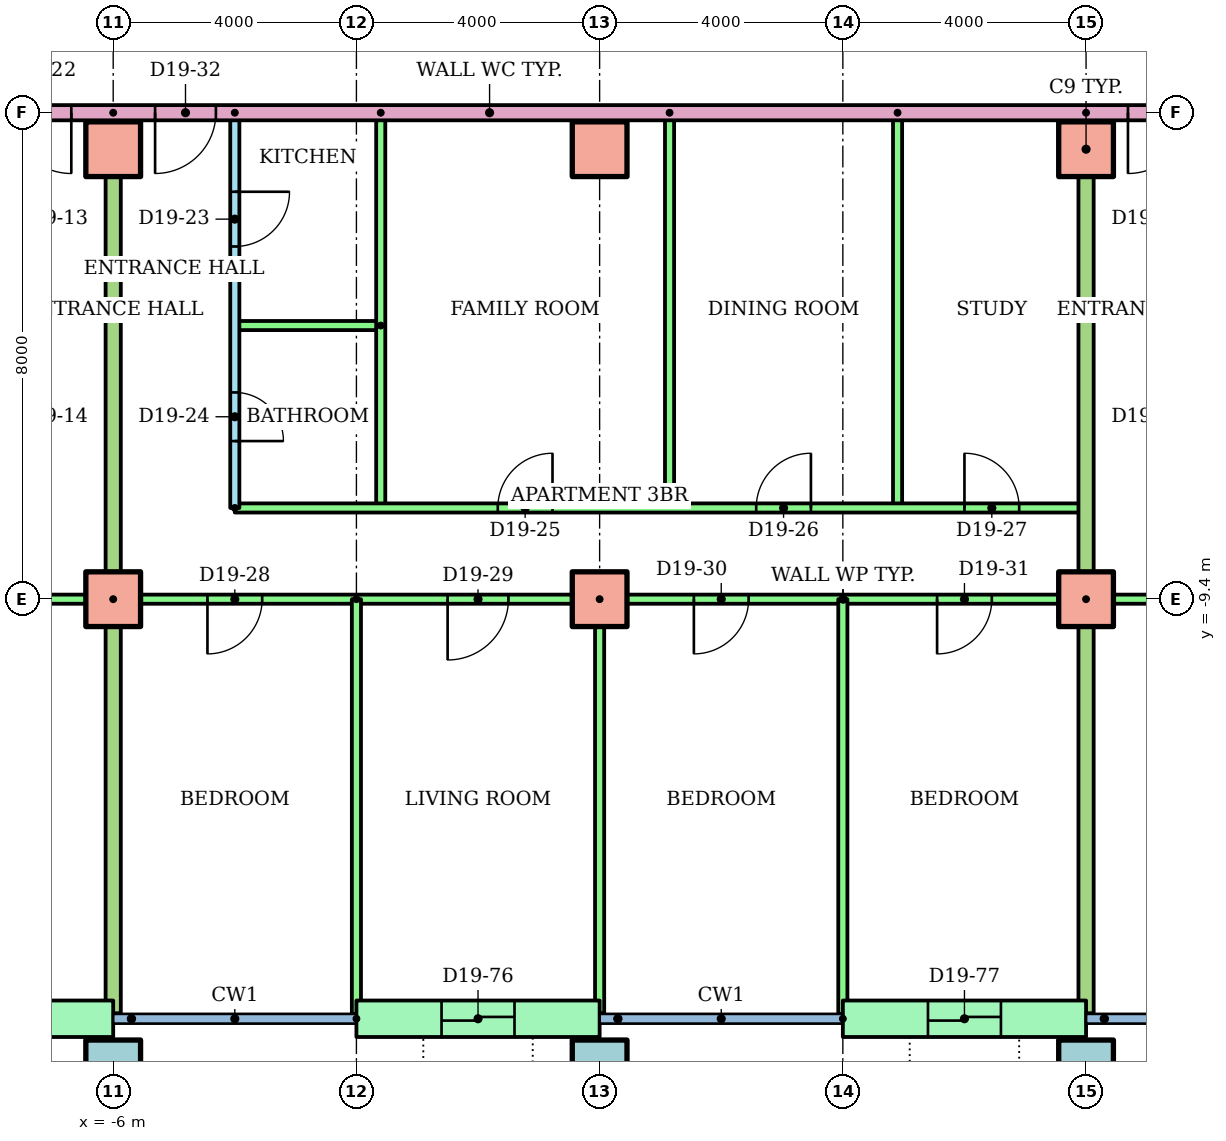
"""IFC4 building model, lengths in metres.
Left out: names, types, materials, properties, quantities, classifications, styles, units other than length and angle.
Written with IfcOpenShell. Run it as: python <this file> out.ifc"""

import sys

from ifc_helpers import new_model, si_unit, direction, frame, frame_2d, origin, origin_2d, place, context, subcontext, project, spatial, rectangle, hollow_rectangle, extrude, element, fill, save


model = new_model("IFC4")
c1 = context("Model", 3, precision=1e-05, world=origin(), true_north=direction((0.0, 1.0)))
c2 = subcontext(c1, "Body", "Model", "MODEL_VIEW")
j1 = project(units=[si_unit("LENGTHUNIT", "METRE"), si_unit("PLANEANGLEUNIT", "RADIAN")], contexts=[c1])
p1 = place(None, origin())
s1 = spatial("IfcSite", under=j1, at=p1, CompositionType="ELEMENT")
p2 = place(p1, origin())
s2 = spatial("IfcBuilding", under=s1, at=p2, CompositionType="ELEMENT")
p3 = place(p2, frame((0.0, 0.0, 77.5)))
s3 = spatial("IfcBuildingStorey", under=s2, at=p3, CompositionType="ELEMENT", Elevation=77.5)
for number, where in (
    (1, (-6.0, -17.1, 0.0)),
    (2, (2.0, -17.1, 0.0)),
    (3, (10.0, -17.1, 0.0)),
):
    element("IfcColumn", number, at=place(p3, frame(where)), inside=s3, PredefinedType="COLUMN", context=c2, shape_type="SweptSolid", body=[
        extrude(hollow_rectangle(XDim=0.9, YDim=0.9, WallThickness=0.045, at=origin_2d()), origin(), (0.0, 0.0, 1.0), 3.2),
    ])
for number, where in (
    (4, (-6.0, -9.4, 0.0)),
    (5, (2.0, -9.4, 0.0)),
    (6, (10.0, -9.4, 0.0)),
    (7, (-6.0, -2.0, 0.0)),
    (8, (2.0, -2.0, 0.0)),
    (9, (10.0, -2.0, 0.0)),
):
    element("IfcColumn", number, at=place(p3, frame(where)), inside=s3, PredefinedType="COLUMN", context=c2, shape_type="SweptSolid", body=[
        extrude(rectangle(XDim=0.9, YDim=0.9, at=origin_2d()), origin(), (0.0, 0.0, 1.0), 3.2),
    ])
p4 = place(p3, frame((-10.0, -16.3, 0.0)))
e10 = element("IfcWall", 10, at=p4, inside=s3, PredefinedType="STANDARD", context=c2, shape_type="SweptSolid", body=[
    extrude(rectangle(XDim=4.0, YDim=0.6, at=frame_2d((2.0, 0.0))), origin(), (0.0, 0.0, 1.0), 2.92),
])
p5 = place(p4, frame((1.4, 0.0, 0.0)))
e11 = element("IfcOpeningElement", 11, at=p5, cuts=e10, PredefinedType="OPENING", context=c2, shape_type="SweptSolid", body=[
    extrude(rectangle(XDim=1.2, YDim=2.1, at=frame_2d((0.6, 1.05))), frame((0.0, 0.31, 0.0), z_axis=(0.0, -1.0, 0.0), x_axis=(1.0, 0.0, 0.0)), (0.0, 0.0, 1.0), 0.62),
])
p6 = place(p3, frame((-2.0, -16.3, 0.0)))
e12 = element("IfcWall", 12, at=p6, inside=s3, PredefinedType="STANDARD", context=c2, shape_type="SweptSolid", body=[
    extrude(rectangle(XDim=4.0, YDim=0.6, at=frame_2d((2.0, 0.0))), origin(), (0.0, 0.0, 1.0), 2.92),
])
p7 = place(p6, frame((1.4, 0.0, 0.0)))
e13 = element("IfcOpeningElement", 13, at=p7, cuts=e12, PredefinedType="OPENING", context=c2, shape_type="SweptSolid", body=[
    extrude(rectangle(XDim=1.2, YDim=2.1, at=frame_2d((0.6, 1.05))), frame((0.0, 0.31, 0.0), z_axis=(0.0, -1.0, 0.0), x_axis=(1.0, 0.0, 0.0)), (0.0, 0.0, 1.0), 0.62),
])
p8 = place(p3, frame((6.0, -16.3, 0.0)))
e14 = element("IfcWall", 14, at=p8, inside=s3, PredefinedType="STANDARD", context=c2, shape_type="SweptSolid", body=[
    extrude(rectangle(XDim=4.0, YDim=0.6, at=frame_2d((2.0, 0.0))), origin(), (0.0, 0.0, 1.0), 2.92),
])
p9 = place(p8, frame((1.4, 0.0, 0.0)))
e15 = element("IfcOpeningElement", 15, at=p9, cuts=e14, PredefinedType="OPENING", context=c2, shape_type="SweptSolid", body=[
    extrude(rectangle(XDim=1.2, YDim=2.1, at=frame_2d((0.6, 1.05))), frame((0.0, 0.31, 0.0), z_axis=(0.0, -1.0, 0.0), x_axis=(1.0, 0.0, 0.0)), (0.0, 0.0, 1.0), 0.62),
])
p10 = place(p3, frame((-6.0, -9.4, 0.0), z_axis=(0.0, 0.0, 1.0), x_axis=(-1.0, 0.0, 0.0)))
e16 = element("IfcWall", 16, at=p10, inside=s3, PredefinedType="PARTITIONING", context=c2, shape_type="SweptSolid", body=[
    extrude(rectangle(XDim=22.61, YDim=0.15, at=frame_2d((11.305, 0.0))), origin(), (0.0, 0.0, 1.0), 2.4),
])
p11 = place(p10, frame((19.7, 0.0, 0.0)))
e17 = element("IfcOpeningElement", 17, at=p11, cuts=e16, PredefinedType="OPENING", context=c2, shape_type="SweptSolid", body=[
    extrude(rectangle(XDim=0.9, YDim=2.1, at=frame_2d((0.45, 1.05))), frame((0.0, 0.085, 0.0), z_axis=(0.0, -1.0, 0.0), x_axis=(1.0, 0.0, 0.0)), (0.0, 0.0, 1.0), 0.17),
])
p12 = place(p10, frame((12.45, 0.0, 0.0)))
e18 = element("IfcOpeningElement", 18, at=p12, cuts=e16, PredefinedType="OPENING", context=c2, shape_type="SweptSolid", body=[
    extrude(rectangle(XDim=1.0, YDim=2.1, at=frame_2d((0.5, 1.05))), frame((0.0, 0.085, 0.0), z_axis=(0.0, -1.0, 0.0), x_axis=(1.0, 0.0, 0.0)), (0.0, 0.0, 1.0), 0.17),
])
p13 = place(p10, frame((5.55, 0.0, 0.0)))
e19 = element("IfcOpeningElement", 19, at=p13, cuts=e16, PredefinedType="OPENING", context=c2, shape_type="SweptSolid", body=[
    extrude(rectangle(XDim=0.9, YDim=2.1, at=frame_2d((0.45, 1.05))), frame((0.0, 0.085, 0.0), z_axis=(0.0, -1.0, 0.0), x_axis=(1.0, 0.0, 0.0)), (0.0, 0.0, 1.0), 0.17),
])
p14 = place(p10, frame((1.55, 0.0, 0.0)))
e20 = element("IfcOpeningElement", 20, at=p14, cuts=e16, PredefinedType="OPENING", context=c2, shape_type="SweptSolid", body=[
    extrude(rectangle(XDim=0.9, YDim=2.1, at=frame_2d((0.45, 1.05))), frame((0.0, 0.085, 0.0), z_axis=(0.0, -1.0, 0.0), x_axis=(1.0, 0.0, 0.0)), (0.0, 0.0, 1.0), 0.17),
])
p15 = place(p3, frame((-4.0, -1.4, 0.0), z_axis=(0.0, 0.0, 1.0), x_axis=(0.0, -1.0, 0.0)))
e21 = element("IfcWall", 21, at=p15, inside=s3, PredefinedType="PARTITIONING", context=c2, shape_type="SweptSolid", body=[
    extrude(rectangle(XDim=6.5, YDim=0.15, at=frame_2d((3.25, 0.0))), origin(), (0.0, 0.0, 1.0), 2.4),
])
p16 = place(p15, frame((1.3, 0.0, 0.0)))
e22 = element("IfcOpeningElement", 22, at=p16, cuts=e21, PredefinedType="OPENING", context=c2, shape_type="SweptSolid", body=[
    extrude(rectangle(XDim=0.9, YDim=2.1, at=frame_2d((0.45, 1.05))), frame((0.0, 0.085, 0.0), z_axis=(0.0, -1.0, 0.0), x_axis=(1.0, 0.0, 0.0)), (0.0, 0.0, 1.0), 0.17),
])
p17 = place(p15, frame((4.6, 0.0, 0.0)))
e23 = element("IfcOpeningElement", 23, at=p17, cuts=e21, PredefinedType="OPENING", context=c2, shape_type="SweptSolid", body=[
    extrude(rectangle(XDim=0.8, YDim=2.1, at=frame_2d((0.4, 1.05))), frame((0.0, 0.085, 0.0), z_axis=(0.0, -1.0, 0.0), x_axis=(1.0, 0.0, 0.0)), (0.0, 0.0, 1.0), 0.17),
])
p18 = place(p3, frame((-1.6, -4.9, 0.0), z_axis=(0.0, 0.0, 1.0), x_axis=(-1.0, 0.0, 0.0)))
e24 = element("IfcWall", 24, at=p18, inside=s3, PredefinedType="PARTITIONING", context=c2, shape_type="SweptSolid", body=[
    extrude(rectangle(XDim=2.4, YDim=0.15, at=frame_2d((1.2, 0.0))), origin(), (0.0, 0.0, 1.0), 2.4),
])
for number, where, z_axis, x_axis in (
    (25, (-1.6, -1.4, 0.0), (0.0, 0.0, 1.0), (0.0, -1.0, 0.0)),
    (26, (3.15, -1.4, 0.0), (0.0, 0.0, 1.0), (0.0, -1.0, 0.0)),
    (27, (6.9, -1.4, 0.0), (0.0, 0.0, 1.0), (0.0, -1.0, 0.0)),
):
    element("IfcWall", number, at=place(p3, frame(where, z_axis=z_axis, x_axis=x_axis)), inside=s3, PredefinedType="PARTITIONING", context=c2, shape_type="SweptSolid", body=[
        extrude(rectangle(XDim=6.5, YDim=0.15, at=frame_2d((3.25, 0.0))), origin(), (0.0, 0.0, 1.0), 2.4),
    ])
p19 = place(p3, frame((-4.0, -7.9, 0.0)))
e28 = element("IfcWall", 28, at=p19, inside=s3, PredefinedType="PARTITIONING", context=c2, shape_type="SweptSolid", body=[
    extrude(rectangle(XDim=14.0, YDim=0.15, at=frame_2d((7.0, 0.0))), origin(), (0.0, 0.0, 1.0), 2.4),
])
p20 = place(p19, frame((4.325, 0.0, 0.0)))
e29 = element("IfcOpeningElement", 29, at=p20, cuts=e28, PredefinedType="OPENING", context=c2, shape_type="SweptSolid", body=[
    extrude(rectangle(XDim=0.9, YDim=2.1, at=frame_2d((0.45, 1.05))), frame((0.0, 0.085, 0.0), z_axis=(0.0, -1.0, 0.0), x_axis=(1.0, 0.0, 0.0)), (0.0, 0.0, 1.0), 0.17),
])
p21 = place(p19, frame((8.575, 0.0, 0.0)))
e30 = element("IfcOpeningElement", 30, at=p21, cuts=e28, PredefinedType="OPENING", context=c2, shape_type="SweptSolid", body=[
    extrude(rectangle(XDim=0.9, YDim=2.1, at=frame_2d((0.45, 1.05))), frame((0.0, 0.085, 0.0), z_axis=(0.0, -1.0, 0.0), x_axis=(1.0, 0.0, 0.0)), (0.0, 0.0, 1.0), 0.17),
])
p22 = place(p19, frame((12.0, 0.0, 0.0)))
e31 = element("IfcOpeningElement", 31, at=p22, cuts=e28, PredefinedType="OPENING", context=c2, shape_type="SweptSolid", body=[
    extrude(rectangle(XDim=0.9, YDim=2.1, at=frame_2d((0.45, 1.05))), frame((0.0, 0.085, 0.0), z_axis=(0.0, -1.0, 0.0), x_axis=(1.0, 0.0, 0.0)), (0.0, 0.0, 1.0), 0.17),
])
p23 = place(p3, frame((10.0, -9.4, 0.0), z_axis=(0.0, 0.0, 1.0), x_axis=(-1.0, 0.0, 0.0)))
e32 = element("IfcWall", 32, at=p23, inside=s3, PredefinedType="PARTITIONING", context=c2, shape_type="SweptSolid", body=[
    extrude(rectangle(XDim=16.0, YDim=0.15, at=frame_2d((8.0, 0.0))), origin(), (0.0, 0.0, 1.0), 2.4),
])
p24 = place(p23, frame((13.55, 0.0, 0.0)))
e33 = element("IfcOpeningElement", 33, at=p24, cuts=e32, PredefinedType="OPENING", context=c2, shape_type="SweptSolid", body=[
    extrude(rectangle(XDim=0.9, YDim=2.1, at=frame_2d((0.45, 1.05))), frame((0.0, 0.085, 0.0), z_axis=(0.0, -1.0, 0.0), x_axis=(1.0, 0.0, 0.0)), (0.0, 0.0, 1.0), 0.17),
])
p25 = place(p23, frame((9.5, 0.0, 0.0)))
e34 = element("IfcOpeningElement", 34, at=p25, cuts=e32, PredefinedType="OPENING", context=c2, shape_type="SweptSolid", body=[
    extrude(rectangle(XDim=1.0, YDim=2.1, at=frame_2d((0.5, 1.05))), frame((0.0, 0.085, 0.0), z_axis=(0.0, -1.0, 0.0), x_axis=(1.0, 0.0, 0.0)), (0.0, 0.0, 1.0), 0.17),
])
p26 = place(p23, frame((5.55, 0.0, 0.0)))
e35 = element("IfcOpeningElement", 35, at=p26, cuts=e32, PredefinedType="OPENING", context=c2, shape_type="SweptSolid", body=[
    extrude(rectangle(XDim=0.9, YDim=2.1, at=frame_2d((0.45, 1.05))), frame((0.0, 0.085, 0.0), z_axis=(0.0, -1.0, 0.0), x_axis=(1.0, 0.0, 0.0)), (0.0, 0.0, 1.0), 0.17),
])
p27 = place(p23, frame((1.55, 0.0, 0.0)))
e36 = element("IfcOpeningElement", 36, at=p27, cuts=e32, PredefinedType="OPENING", context=c2, shape_type="SweptSolid", body=[
    extrude(rectangle(XDim=0.9, YDim=2.1, at=frame_2d((0.45, 1.05))), frame((0.0, 0.085, 0.0), z_axis=(0.0, -1.0, 0.0), x_axis=(1.0, 0.0, 0.0)), (0.0, 0.0, 1.0), 0.17),
])
p28 = place(p3, frame((-2.0, -9.4, 0.0), z_axis=(0.0, 0.0, 1.0), x_axis=(0.0, -1.0, 0.0)))
e37 = element("IfcWall", 37, at=p28, inside=s3, PredefinedType="PARTITIONING", context=c2, shape_type="SweptSolid", body=[
    extrude(rectangle(XDim=6.821, YDim=0.15, at=frame_2d((3.411, 0.0))), origin(), (0.0, 0.0, 1.0), 2.4),
])
p29 = place(p3, frame((2.0, -9.4, 0.0), z_axis=(0.0, 0.0, 1.0), x_axis=(0.0, -1.0, 0.0)))
e38 = element("IfcWall", 38, at=p29, inside=s3, PredefinedType="PARTITIONING", context=c2, shape_type="SweptSolid", body=[
    extrude(rectangle(XDim=6.81, YDim=0.15, at=frame_2d((3.405, 0.0))), origin(), (0.0, 0.0, 1.0), 2.4),
])
p30 = place(p3, frame((6.0, -9.4, 0.0), z_axis=(0.0, 0.0, 1.0), x_axis=(0.0, -1.0, 0.0)))
e39 = element("IfcWall", 39, at=p30, inside=s3, PredefinedType="PARTITIONING", context=c2, shape_type="SweptSolid", body=[
    extrude(rectangle(XDim=6.821, YDim=0.15, at=frame_2d((3.411, 0.0))), origin(), (0.0, 0.0, 1.0), 2.4),
])
p31 = place(p3, frame((-6.0, -1.4, 0.0), z_axis=(0.0, 0.0, 1.0), x_axis=(0.0, -1.0, 0.0)))
e40 = element("IfcWall", 40, at=p31, inside=s3, PredefinedType="PARTITIONING", context=c2, shape_type="SweptSolid", body=[
    extrude(rectangle(XDim=14.81, YDim=0.25, at=frame_2d((7.405, 0.0))), origin(), (0.0, 0.0, 1.0), 2.4),
])
p32 = place(p3, frame((26.0, -9.4, 0.0), z_axis=(0.0, 0.0, 1.0), x_axis=(-1.0, 0.0, 0.0)))
e41 = element("IfcWall", 41, at=p32, inside=s3, PredefinedType="PARTITIONING", context=c2, shape_type="SweptSolid", body=[
    extrude(rectangle(XDim=16.0, YDim=0.15, at=frame_2d((8.0, 0.0))), origin(), (0.0, 0.0, 1.0), 2.4),
])
p33 = place(p32, frame((13.55, 0.0, 0.0)))
e42 = element("IfcOpeningElement", 42, at=p33, cuts=e41, PredefinedType="OPENING", context=c2, shape_type="SweptSolid", body=[
    extrude(rectangle(XDim=0.9, YDim=2.1, at=frame_2d((0.45, 1.05))), frame((0.0, 0.085, 0.0), z_axis=(0.0, -1.0, 0.0), x_axis=(1.0, 0.0, 0.0)), (0.0, 0.0, 1.0), 0.17),
])
p34 = place(p32, frame((9.55, 0.0, 0.0)))
e43 = element("IfcOpeningElement", 43, at=p34, cuts=e41, PredefinedType="OPENING", context=c2, shape_type="SweptSolid", body=[
    extrude(rectangle(XDim=0.9, YDim=2.1, at=frame_2d((0.45, 1.05))), frame((0.0, 0.085, 0.0), z_axis=(0.0, -1.0, 0.0), x_axis=(1.0, 0.0, 0.0)), (0.0, 0.0, 1.0), 0.17),
])
p35 = place(p32, frame((5.55, 0.0, 0.0)))
e44 = element("IfcOpeningElement", 44, at=p35, cuts=e41, PredefinedType="OPENING", context=c2, shape_type="SweptSolid", body=[
    extrude(rectangle(XDim=0.9, YDim=2.1, at=frame_2d((0.45, 1.05))), frame((0.0, 0.085, 0.0), z_axis=(0.0, -1.0, 0.0), x_axis=(1.0, 0.0, 0.0)), (0.0, 0.0, 1.0), 0.17),
])
p36 = place(p32, frame((1.5, 0.0, 0.0)))
e45 = element("IfcOpeningElement", 45, at=p36, cuts=e41, PredefinedType="OPENING", context=c2, shape_type="SweptSolid", body=[
    extrude(rectangle(XDim=1.0, YDim=2.1, at=frame_2d((0.5, 1.05))), frame((0.0, 0.085, 0.0), z_axis=(0.0, -1.0, 0.0), x_axis=(1.0, 0.0, 0.0)), (0.0, 0.0, 1.0), 0.17),
])
p37 = place(p3, frame((10.0, -1.4, 0.0), z_axis=(0.0, 0.0, 1.0), x_axis=(0.0, -1.0, 0.0)))
e46 = element("IfcWall", 46, at=p37, inside=s3, PredefinedType="PARTITIONING", context=c2, shape_type="SweptSolid", body=[
    extrude(rectangle(XDim=14.81, YDim=0.25, at=frame_2d((7.405, 0.0))), origin(), (0.0, 0.0, 1.0), 2.4),
])
p38 = place(p3, frame((14.0, -1.4, 0.0), z_axis=(0.0, 0.0, 1.0), x_axis=(-1.0, 0.0, 0.0)))
e47 = element("IfcWall", 47, at=p38, inside=s3, PredefinedType="PARTITIONING", context=c2, shape_type="SweptSolid", body=[
    extrude(rectangle(XDim=28.0, YDim=0.25, at=frame_2d((14.0, 0.0))), origin(), (0.0, 0.0, 1.0), 2.4),
])
p39 = place(p38, frame((20.689, 0.0, 0.0)))
e48 = element("IfcOpeningElement", 48, at=p39, cuts=e47, PredefinedType="OPENING", context=c2, shape_type="SweptSolid", body=[
    extrude(rectangle(XDim=1.0, YDim=2.1, at=frame_2d((0.5, 1.05))), frame((0.0, 0.135, 0.0), z_axis=(0.0, -1.0, 0.0), x_axis=(1.0, 0.0, 0.0)), (0.0, 0.0, 1.0), 0.27),
])
p40 = place(p38, frame((18.311, 0.0, 0.0)))
e49 = element("IfcOpeningElement", 49, at=p40, cuts=e47, PredefinedType="OPENING", context=c2, shape_type="SweptSolid", body=[
    extrude(rectangle(XDim=1.0, YDim=2.1, at=frame_2d((0.5, 1.05))), frame((0.0, 0.135, 0.0), z_axis=(0.0, -1.0, 0.0), x_axis=(1.0, 0.0, 0.0)), (0.0, 0.0, 1.0), 0.27),
])
p41 = place(p38, frame((2.311, 0.0, 0.0)))
e50 = element("IfcOpeningElement", 50, at=p41, cuts=e47, PredefinedType="OPENING", context=c2, shape_type="SweptSolid", body=[
    extrude(rectangle(XDim=1.0, YDim=2.1, at=frame_2d((0.5, 1.05))), frame((0.0, 0.135, 0.0), z_axis=(0.0, -1.0, 0.0), x_axis=(1.0, 0.0, 0.0)), (0.0, 0.0, 1.0), 0.27),
])
p42 = place(p39, origin())
e51 = element("IfcDoor", 51, at=p42, inside=s3, OperationType="SINGLE_SWING_LEFT", PredefinedType="DOOR", context=c2, shape_type="SweptSolid", body=[
    extrude(rectangle(XDim=1.0, YDim=2.1, at=frame_2d((0.5, 1.05))), frame((0.0, 0.025, 0.0), z_axis=(0.0, -1.0, 0.0), x_axis=(1.0, 0.0, 0.0)), (0.0, 0.0, 1.0), 0.05),
])
fill(e48, e51)
p43 = place(p16, origin())
e52 = element("IfcDoor", 52, at=p43, inside=s3, OperationType="SINGLE_SWING_LEFT", PredefinedType="DOOR", context=c2, shape_type="SweptSolid", body=[
    extrude(rectangle(XDim=0.9, YDim=2.1, at=frame_2d((0.45, 1.05))), frame((0.0, 0.025, 0.0), z_axis=(0.0, -1.0, 0.0), x_axis=(1.0, 0.0, 0.0)), (0.0, 0.0, 1.0), 0.05),
])
fill(e22, e52)
p44 = place(p17, origin())
e53 = element("IfcDoor", 53, at=p44, inside=s3, OperationType="SINGLE_SWING_RIGHT", PredefinedType="DOOR", context=c2, shape_type="SweptSolid", body=[
    extrude(rectangle(XDim=0.8, YDim=2.1, at=frame_2d((0.4, 1.05))), frame((0.0, 0.025, 0.0), z_axis=(0.0, -1.0, 0.0), x_axis=(1.0, 0.0, 0.0)), (0.0, 0.0, 1.0), 0.05),
])
fill(e23, e53)
p45 = place(p20, origin())
e54 = element("IfcDoor", 54, at=p45, inside=s3, OperationType="SINGLE_SWING_RIGHT", PredefinedType="DOOR", context=c2, shape_type="SweptSolid", body=[
    extrude(rectangle(XDim=0.9, YDim=2.1, at=frame_2d((0.45, 1.05))), frame((0.0, 0.025, 0.0), z_axis=(0.0, -1.0, 0.0), x_axis=(1.0, 0.0, 0.0)), (0.0, 0.0, 1.0), 0.05),
])
fill(e29, e54)
p46 = place(p21, origin())
e55 = element("IfcDoor", 55, at=p46, inside=s3, OperationType="SINGLE_SWING_RIGHT", PredefinedType="DOOR", context=c2, shape_type="SweptSolid", body=[
    extrude(rectangle(XDim=0.9, YDim=2.1, at=frame_2d((0.45, 1.05))), frame((0.0, 0.025, 0.0), z_axis=(0.0, -1.0, 0.0), x_axis=(1.0, 0.0, 0.0)), (0.0, 0.0, 1.0), 0.05),
])
fill(e30, e55)
p47 = place(p22, origin())
e56 = element("IfcDoor", 56, at=p47, inside=s3, OperationType="SINGLE_SWING_LEFT", PredefinedType="DOOR", context=c2, shape_type="SweptSolid", body=[
    extrude(rectangle(XDim=0.9, YDim=2.1, at=frame_2d((0.45, 1.05))), frame((0.0, 0.025, 0.0), z_axis=(0.0, -1.0, 0.0), x_axis=(1.0, 0.0, 0.0)), (0.0, 0.0, 1.0), 0.05),
])
fill(e31, e56)
p48 = place(p24, origin())
e57 = element("IfcDoor", 57, at=p48, inside=s3, OperationType="SINGLE_SWING_RIGHT", PredefinedType="DOOR", context=c2, shape_type="SweptSolid", body=[
    extrude(rectangle(XDim=0.9, YDim=2.1, at=frame_2d((0.45, 1.05))), frame((0.0, 0.025, 0.0), z_axis=(0.0, -1.0, 0.0), x_axis=(1.0, 0.0, 0.0)), (0.0, 0.0, 1.0), 0.05),
])
fill(e33, e57)
p49 = place(p25, origin())
e58 = element("IfcDoor", 58, at=p49, inside=s3, OperationType="SINGLE_SWING_RIGHT", PredefinedType="DOOR", context=c2, shape_type="SweptSolid", body=[
    extrude(rectangle(XDim=1.0, YDim=2.1, at=frame_2d((0.5, 1.05))), frame((0.0, 0.025, 0.0), z_axis=(0.0, -1.0, 0.0), x_axis=(1.0, 0.0, 0.0)), (0.0, 0.0, 1.0), 0.05),
])
fill(e34, e58)
p50 = place(p26, origin())
e59 = element("IfcDoor", 59, at=p50, inside=s3, OperationType="SINGLE_SWING_RIGHT", PredefinedType="DOOR", context=c2, shape_type="SweptSolid", body=[
    extrude(rectangle(XDim=0.9, YDim=2.1, at=frame_2d((0.45, 1.05))), frame((0.0, 0.025, 0.0), z_axis=(0.0, -1.0, 0.0), x_axis=(1.0, 0.0, 0.0)), (0.0, 0.0, 1.0), 0.05),
])
fill(e35, e59)
p51 = place(p27, origin())
e60 = element("IfcDoor", 60, at=p51, inside=s3, OperationType="SINGLE_SWING_RIGHT", PredefinedType="DOOR", context=c2, shape_type="SweptSolid", body=[
    extrude(rectangle(XDim=0.9, YDim=2.1, at=frame_2d((0.45, 1.05))), frame((0.0, 0.025, 0.0), z_axis=(0.0, -1.0, 0.0), x_axis=(1.0, 0.0, 0.0)), (0.0, 0.0, 1.0), 0.05),
])
fill(e36, e60)
p52 = place(p40, origin())
e61 = element("IfcDoor", 61, at=p52, inside=s3, OperationType="SINGLE_SWING_RIGHT", PredefinedType="DOOR", context=c2, shape_type="SweptSolid", body=[
    extrude(rectangle(XDim=1.0, YDim=2.1, at=frame_2d((0.5, 1.05))), frame((0.0, 0.025, 0.0), z_axis=(0.0, -1.0, 0.0), x_axis=(1.0, 0.0, 0.0)), (0.0, 0.0, 1.0), 0.05),
])
fill(e49, e61)
p53 = place(p41, origin())
e62 = element("IfcDoor", 62, at=p53, inside=s3, OperationType="SINGLE_SWING_RIGHT", PredefinedType="DOOR", context=c2, shape_type="SweptSolid", body=[
    extrude(rectangle(XDim=1.0, YDim=2.1, at=frame_2d((0.5, 1.05))), frame((0.0, 0.025, 0.0), z_axis=(0.0, -1.0, 0.0), x_axis=(1.0, 0.0, 0.0)), (0.0, 0.0, 1.0), 0.05),
])
fill(e50, e62)
p54 = place(p7, origin())
e63 = element("IfcDoor", 63, at=p54, inside=s3, OperationType="SLIDING_TO_LEFT", PredefinedType="DOOR", context=c2, shape_type="SweptSolid", body=[
    extrude(rectangle(XDim=1.2, YDim=2.1, at=frame_2d((0.6, 1.05))), frame((0.0, 0.025, 0.0), z_axis=(0.0, -1.0, 0.0), x_axis=(1.0, 0.0, 0.0)), (0.0, 0.0, 1.0), 0.05),
])
fill(e13, e63)
p55 = place(p9, origin())
e64 = element("IfcDoor", 64, at=p55, inside=s3, OperationType="SLIDING_TO_LEFT", PredefinedType="DOOR", context=c2, shape_type="SweptSolid", body=[
    extrude(rectangle(XDim=1.2, YDim=2.1, at=frame_2d((0.6, 1.05))), frame((0.0, 0.025, 0.0), z_axis=(0.0, -1.0, 0.0), x_axis=(1.0, 0.0, 0.0)), (0.0, 0.0, 1.0), 0.05),
])
fill(e15, e64)
save(model, sys.argv[1])
